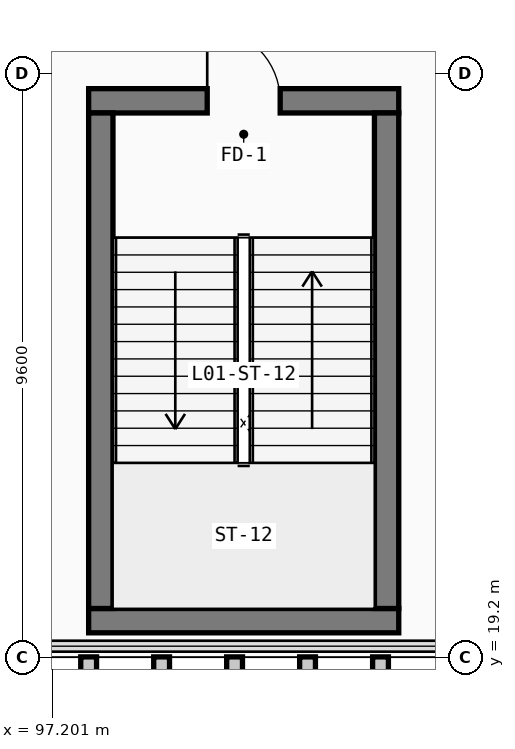
"""IFC4 building model, lengths in metres.
Left out: names, types, materials, properties, quantities, classifications, styles, units other than length and angle.
Written with IfcOpenShell. Run it as: python <this file> out.ifc"""

import sys

from ifc_helpers import new_model, si_unit, direction, frame, frame_2d, origin, place, context, subcontext, project, spatial, rectangle, extrude, element, fill, save


model = new_model("IFC4")
c1 = context("Model", 3, precision=1e-05, world=origin(), true_north=direction((0.0, 1.0)))
c2 = subcontext(c1, "Body", "Model", "MODEL_VIEW")
j1 = project(units=[si_unit("LENGTHUNIT", "METRE"), si_unit("PLANEANGLEUNIT", "RADIAN")], contexts=[c1])
p1 = place(None, origin())
s1 = spatial("IfcSite", under=j1, at=p1, CompositionType="ELEMENT")
p2 = place(p1, origin())
s2 = spatial("IfcBuilding", under=s1, at=p2, CompositionType="ELEMENT")
p3 = place(p2, frame((0.0, 0.0, 4.8)))
s3 = spatial("IfcBuildingStorey", under=s2, at=p3, CompositionType="ELEMENT", Elevation=4.8)
p4 = place(p3, frame((97.8, 19.8, 0.0), z_axis=(0.0, 0.0, 1.0), x_axis=(1.0, 0.0, 0.0)))
e1 = element("IfcWall", 1, at=p4, inside=s3, PredefinedType="SHEAR", context=c2, shape_type="SweptSolid", body=[
    extrude(rectangle(XDim=5.1, YDim=0.4, at=frame_2d((2.55, 0.0))), origin(), (0.0, 0.0, 1.0), 4.52),
])
p5 = place(p3, frame((102.9, 28.35, 0.0), z_axis=(0.0, 0.0, 1.0), x_axis=(-1.0, 0.0, 0.0)))
e2 = element("IfcWall", 2, at=p5, inside=s3, PredefinedType="SHEAR", context=c2, shape_type="SweptSolid", body=[
    extrude(rectangle(XDim=5.1, YDim=0.4, at=frame_2d((2.55, 0.0))), origin(), (0.0, 0.0, 1.0), 4.52),
])
p6 = place(p5, frame((3.15, 0.0, 0.0), z_axis=(0.0, 0.0, 1.0), x_axis=(-1.0, 0.0, 0.0)))
e3 = element("IfcOpeningElement", 3, at=p6, cuts=e2, PredefinedType="OPENING", context=c2, shape_type="SweptSolid", body=[
    extrude(rectangle(XDim=1.2, YDim=2.2, at=frame_2d((0.6, 1.1))), frame((0.0, 0.21, 0.0), z_axis=(0.0, -1.0, 0.0), x_axis=(1.0, 0.0, 0.0)), (0.0, 0.0, 1.0), 0.42),
])
for number, where, z_axis, x_axis in (
    (4, (98.0, 28.15, 0.0), (0.0, 0.0, 1.0), (0.0, -1.0, 0.0)),
    (5, (102.7, 20.0, 0.0), (0.0, 0.0, 1.0), (0.0, 1.0, 0.0)),
):
    element("IfcWall", number, at=place(p3, frame(where, z_axis=z_axis, x_axis=x_axis)), inside=s3, PredefinedType="SHEAR", context=c2, shape_type="SweptSolid", body=[
        extrude(rectangle(XDim=8.15, YDim=0.4, at=frame_2d((4.075, 0.0))), origin(), (0.0, 0.0, 1.0), 4.52),
    ])
p7 = place(p6, origin())
e6 = element("IfcDoor", 6, at=p7, inside=s3, OperationType="SINGLE_SWING_LEFT", PredefinedType="DOOR", context=c2, shape_type="SweptSolid", body=[
    extrude(rectangle(XDim=1.2, YDim=2.2, at=frame_2d((0.6, 1.1))), frame((0.0, 0.025, 0.0), z_axis=(0.0, -1.0, 0.0), x_axis=(1.0, 0.0, 0.0)), (0.0, 0.0, 1.0), 0.05),
])
fill(e3, e6)
save(model, sys.argv[1])
